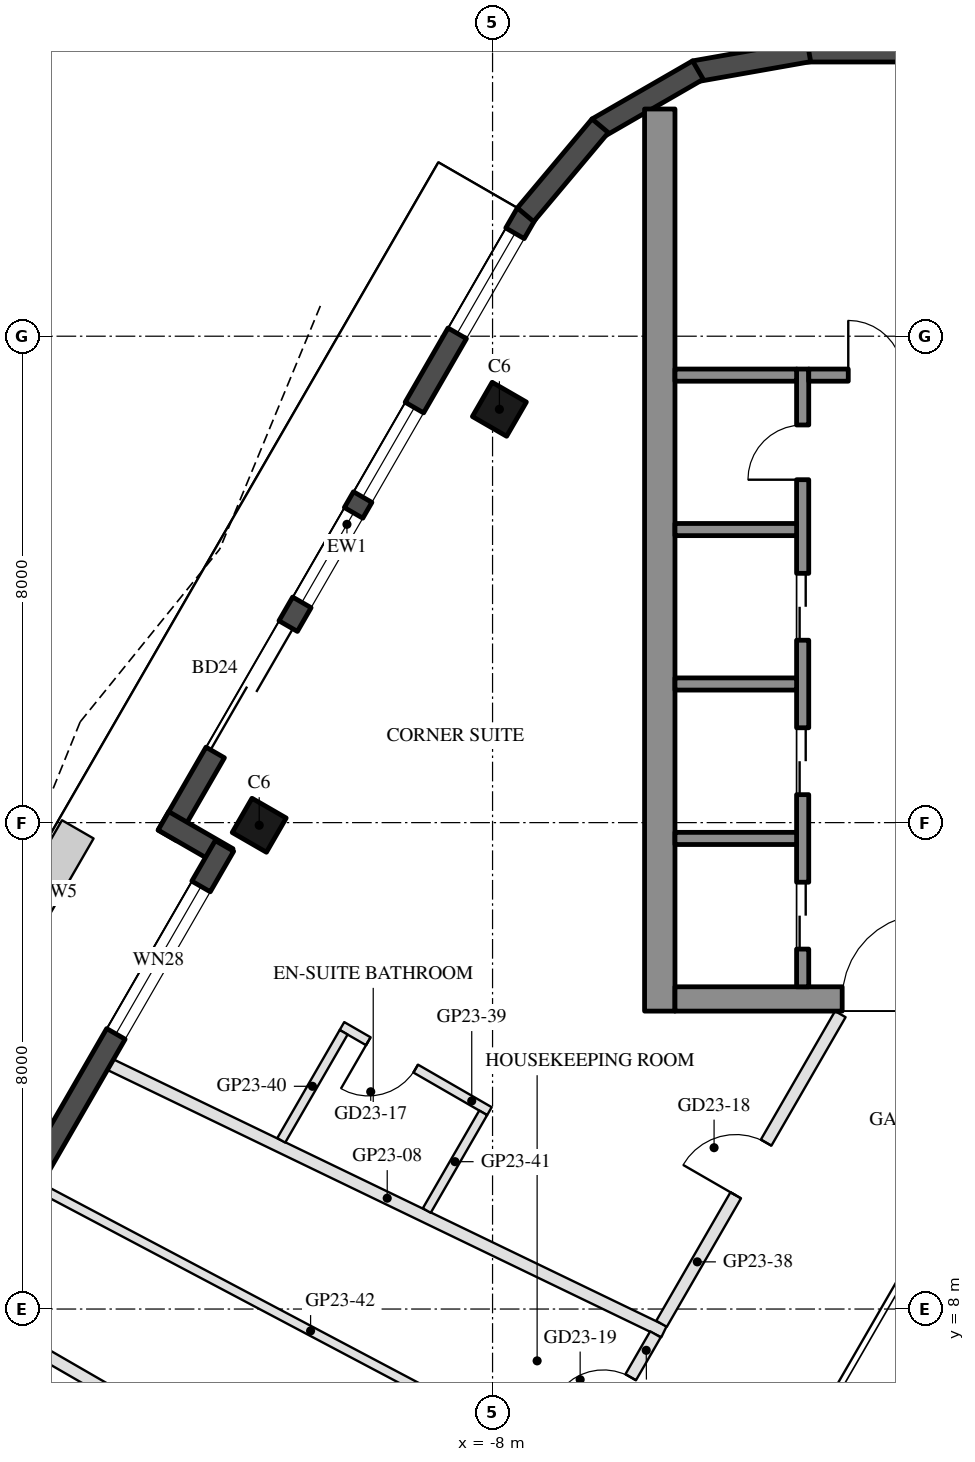
"""IFC4 building model, lengths in metres.
Left out: names, types, materials, properties, quantities, classifications, styles, units other than length and angle.
Written with IfcOpenShell. Run it as: python <this file> out.ifc"""

import sys

from ifc_helpers import new_model, si_unit, direction, frame, frame_2d, origin, origin_2d, place, context, subcontext, project, spatial, rectangle, hollow_rectangle, extrude, boolean, halfspace, element, fill, save


model = new_model("IFC4")
c1 = context("Model", 3, precision=1e-05, world=origin(), true_north=direction((0.0, 1.0)))
c2 = subcontext(c1, "Body", "Model", "MODEL_VIEW")
j1 = project(units=[si_unit("LENGTHUNIT", "METRE"), si_unit("PLANEANGLEUNIT", "RADIAN")], contexts=[c1])
p1 = place(None, origin())
s1 = spatial("IfcSite", under=j1, at=p1, CompositionType="ELEMENT")
p2 = place(p1, origin())
s2 = spatial("IfcBuilding", under=s1, at=p2, CompositionType="ELEMENT")
p3 = place(p2, frame((0.0, 0.0, 250.4)))
s3 = spatial("IfcBuildingStorey", under=s2, at=p3, CompositionType="ELEMENT", Elevation=250.4)
p4 = place(p3, frame((-7.888, 22.798, 0.0), z_axis=(0.0, 0.0, 1.0), x_axis=(0.5, 0.866025403784, 0.0)))
e1 = element("IfcColumn", 1, at=p4, inside=s3, PredefinedType="COLUMN", context=c2, shape_type="SweptSolid", body=[
    boolean("DIFFERENCE", extrude(hollow_rectangle(XDim=0.65, YDim=0.65, WallThickness=0.03, at=origin_2d()), origin(), (0.0, 0.0, 1.0), 3.7), halfspace(frame((0.0, 0.0, 3.653), z_axis=(0.0, 0.0, 1.0), x_axis=(1.0, 0.0, 0.0)), False)),
])
p5 = place(p3, frame((-11.838, 15.957, 0.0), z_axis=(0.0, 0.0, 1.0), x_axis=(0.5, 0.866025403784, 0.0)))
e2 = element("IfcColumn", 2, at=p5, inside=s3, PredefinedType="COLUMN", context=c2, shape_type="SweptSolid", body=[
    boolean("DIFFERENCE", extrude(hollow_rectangle(XDim=0.65, YDim=0.65, WallThickness=0.03, at=origin_2d()), origin(), (0.0, 0.0, 1.0), 3.7), halfspace(frame((0.0, 0.0, 3.66), z_axis=(0.0, 0.0, 1.0), x_axis=(1.0, 0.0, 0.0)), False)),
])
p6 = place(p3, frame((-7.441, 26.022, 0.0), z_axis=(0.0, 0.0, 1.0), x_axis=(-0.499992533062, -0.86602971478, 0.0)))
e3 = element("IfcWall", 3, at=p6, inside=s3, PredefinedType="SOLIDWALL", context=c2, shape_type="SweptSolid", body=[
    extrude(rectangle(XDim=11.816, YDim=0.35, at=frame_2d((5.908, 0.0))), origin(), (0.0, 0.0, 1.0), 3.55),
])
p7 = place(p6, frame((0.381, 0.0, 0.3)))
e4 = element("IfcOpeningElement", 4, at=p7, cuts=e3, PredefinedType="OPENING", context=c2, shape_type="SweptSolid", body=[
    extrude(rectangle(XDim=1.9, YDim=2.65, at=frame_2d((0.95, 1.325))), frame((0.0, 0.185, 0.0), z_axis=(0.0, -1.0, 0.0), x_axis=(1.0, 0.0, 0.0)), (0.0, 0.0, 1.0), 0.37),
])
p8 = place(p6, frame((7.841, 0.0, 0.0)))
e5 = element("IfcOpeningElement", 5, at=p8, cuts=e3, PredefinedType="OPENING", context=c2, shape_type="SweptSolid", body=[
    extrude(rectangle(XDim=2.4, YDim=2.4, at=frame_2d((1.2, 1.2))), frame((0.0, 0.185, 0.0), z_axis=(0.0, -1.0, 0.0), x_axis=(1.0, 0.0, 0.0)), (0.0, 0.0, 1.0), 0.37),
])
p9 = place(p6, frame((3.69, 0.0, 0.3)))
e6 = element("IfcOpeningElement", 6, at=p9, cuts=e3, PredefinedType="OPENING", context=c2, shape_type="SweptSolid", body=[
    extrude(rectangle(XDim=1.7, YDim=2.65, at=frame_2d((0.85, 1.325))), frame((0.0, 0.185, 0.0), z_axis=(0.0, -1.0, 0.0), x_axis=(1.0, 0.0, 0.0)), (0.0, 0.0, 1.0), 0.37),
])
p10 = place(p6, frame((5.69, 0.0, 0.3)))
e7 = element("IfcOpeningElement", 7, at=p10, cuts=e3, PredefinedType="OPENING", context=c2, shape_type="SweptSolid", body=[
    extrude(rectangle(XDim=1.7, YDim=2.65, at=frame_2d((0.85, 1.325))), frame((0.0, 0.185, 0.0), z_axis=(0.0, -1.0, 0.0), x_axis=(1.0, 0.0, 0.0)), (0.0, 0.0, 1.0), 0.37),
])
p11 = place(p3, frame((-13.413, 16.029, 0.0), z_axis=(0.0, 0.0, 1.0), x_axis=(0.866005645448, -0.500034220881, 0.0)))
e8 = element("IfcWall", 8, at=p11, inside=s3, PredefinedType="SOLIDWALL", context=c2, shape_type="SweptSolid", body=[
    extrude(rectangle(XDim=1.22, YDim=0.35, at=frame_2d((0.61, 0.0))), origin(), (0.0, 0.0, 1.0), 3.55),
])
p12 = place(p3, frame((-12.409, 15.617, 0.0), z_axis=(0.0, 0.0, 1.0), x_axis=(-0.500003597184, -0.866023326939, 0.0)))
e9 = element("IfcWall", 9, at=p12, inside=s3, PredefinedType="SOLIDWALL", context=c2, shape_type="SweptSolid", body=[
    extrude(rectangle(XDim=6.74, YDim=0.35, at=frame_2d((3.37, 0.0))), origin(), (0.0, 0.0, 1.0), 3.55),
])
p13 = place(p12, frame((0.77, 0.0, 0.3)))
e10 = element("IfcOpeningElement", 10, at=p13, cuts=e9, PredefinedType="OPENING", context=c2, shape_type="SweptSolid", body=[
    extrude(rectangle(XDim=2.8, YDim=2.65, at=frame_2d((1.4, 1.325))), frame((0.0, 0.185, 0.0), z_axis=(0.0, -1.0, 0.0), x_axis=(1.0, 0.0, 0.0)), (0.0, 0.0, 1.0), 0.37),
])
p14 = place(p3, frame((2.829, 28.685, 0.0), z_axis=(0.0, 0.0, 1.0), x_axis=(-1.0, 0.0, 0.0)))
e11 = element("IfcWall", 11, at=p14, inside=s3, PredefinedType="SOLIDWALL", context=c2, shape_type="SweptSolid", body=[
    extrude(rectangle(XDim=5.658, YDim=0.35, at=frame_2d((2.829, 0.0))), origin(), (0.0, 0.0, 1.0), 3.55),
])
for number, where, z_axis, x_axis in (
    (12, (-2.799, 28.688, 0.0), (0.0, 0.0, 1.0), (-0.985, -0.174, 0.0)),
    (13, (-4.623, 28.377, 0.0), (0.0, 0.0, 1.0), (-0.866, -0.5, 0.0)),
):
    element("IfcWall", number, at=place(p3, frame(where, z_axis=z_axis, x_axis=x_axis)), inside=s3, PredefinedType="SOLIDWALL", context=c2, shape_type="SweptSolid", body=[
        extrude(rectangle(XDim=1.91, YDim=0.35, at=frame_2d((0.955, 0.0))), origin(), (0.0, 0.0, 1.0), 3.55),
    ])
p15 = place(p3, frame((-6.23, 27.461, 0.0), z_axis=(0.0, 0.0, 1.0), x_axis=(-0.642808304945, -0.766027077259, 0.0)))
e14 = element("IfcWall", 14, at=p15, inside=s3, PredefinedType="SOLIDWALL", context=c2, shape_type="SweptSolid", body=[
    extrude(rectangle(XDim=1.91, YDim=0.35, at=frame_2d((0.955, 0.0))), origin(), (0.0, 0.0, 1.0), 3.55),
])
p16 = place(p3, frame((-5.25, 12.9, 0.0), z_axis=(0.0, 0.0, 1.0), x_axis=(0.0, 1.0, 0.0)))
e15 = element("IfcWall", 15, at=p16, inside=s3, PredefinedType="SHEAR", context=c2, shape_type="SweptSolid", body=[
    extrude(rectangle(XDim=14.837, YDim=0.5, at=frame_2d((7.418, 0.0))), origin(), (0.0, 0.0, 1.0), 3.5),
])
p17 = place(p3, frame((5.0, 13.1, 0.0), z_axis=(0.0, 0.0, 1.0), x_axis=(-1.0, 0.0, 0.0)))
e16 = element("IfcWall", 16, at=p17, inside=s3, PredefinedType="SHEAR", context=c2, shape_type="SweptSolid", body=[
    extrude(rectangle(XDim=10.0, YDim=0.4, at=frame_2d((5.0, 0.0))), origin(), (0.0, 0.0, 1.0), 3.5),
])
p18 = place(p17, frame((3.55, 0.0, 0.0)))
e17 = element("IfcOpeningElement", 17, at=p18, cuts=e16, PredefinedType="OPENING", context=c2, shape_type="SweptSolid", body=[
    extrude(rectangle(XDim=1.1, YDim=2.1, at=frame_2d((0.55, 1.05))), frame((0.0, 0.21, 0.0), z_axis=(0.0, -1.0, 0.0), x_axis=(1.0, 0.0, 0.0)), (0.0, 0.0, 1.0), 0.42),
])
p19 = place(p17, frame((5.85, 0.0, 0.0)))
e18 = element("IfcOpeningElement", 18, at=p19, cuts=e16, PredefinedType="OPENING", context=c2, shape_type="SweptSolid", body=[
    extrude(rectangle(XDim=1.4, YDim=2.1, at=frame_2d((0.7, 1.05))), frame((0.0, 0.21, 0.0), z_axis=(0.0, -1.0, 0.0), x_axis=(1.0, 0.0, 0.0)), (0.0, 0.0, 1.0), 0.42),
])
p20 = place(p3, frame((-2.9, 13.3, 0.0), z_axis=(0.0, 0.0, 1.0), x_axis=(0.0, 1.0, 0.0)))
e19 = element("IfcWall", 19, at=p20, inside=s3, PredefinedType="SHEAR", context=c2, shape_type="SweptSolid", body=[
    extrude(rectangle(XDim=10.16, YDim=0.2, at=frame_2d((5.08, 0.0))), origin(), (0.0, 0.0, 1.0), 3.5),
])
p21 = place(p20, frame((0.62, 0.0, 0.0)))
e20 = element("IfcOpeningElement", 20, at=p21, cuts=e19, PredefinedType="OPENING", context=c2, shape_type="SweptSolid", body=[
    extrude(rectangle(XDim=1.1, YDim=2.1, at=frame_2d((0.55, 1.05))), frame((0.0, 0.11, 0.0), z_axis=(0.0, -1.0, 0.0), x_axis=(1.0, 0.0, 0.0)), (0.0, 0.0, 1.0), 0.22),
])
p22 = place(p20, frame((3.16, 0.0, 0.0)))
e21 = element("IfcOpeningElement", 21, at=p22, cuts=e19, PredefinedType="OPENING", context=c2, shape_type="SweptSolid", body=[
    extrude(rectangle(XDim=1.1, YDim=2.1, at=frame_2d((0.55, 1.05))), frame((0.0, 0.11, 0.0), z_axis=(0.0, -1.0, 0.0), x_axis=(1.0, 0.0, 0.0)), (0.0, 0.0, 1.0), 0.22),
])
p23 = place(p20, frame((5.7, 0.0, 0.0)))
e22 = element("IfcOpeningElement", 22, at=p23, cuts=e19, PredefinedType="OPENING", context=c2, shape_type="SweptSolid", body=[
    extrude(rectangle(XDim=1.1, YDim=2.1, at=frame_2d((0.55, 1.05))), frame((0.0, 0.11, 0.0), z_axis=(0.0, -1.0, 0.0), x_axis=(1.0, 0.0, 0.0)), (0.0, 0.0, 1.0), 0.22),
])
p24 = place(p20, frame((8.34, 0.0, 0.0)))
e23 = element("IfcOpeningElement", 23, at=p24, cuts=e19, PredefinedType="OPENING", context=c2, shape_type="SweptSolid", body=[
    extrude(rectangle(XDim=0.9, YDim=2.1, at=frame_2d((0.45, 1.05))), frame((0.0, 0.11, 0.0), z_axis=(0.0, -1.0, 0.0), x_axis=(1.0, 0.0, 0.0)), (0.0, 0.0, 1.0), 0.22),
])
p25 = place(p3, frame((-0.4, 23.36, 0.0), z_axis=(0.0, 0.0, 1.0), x_axis=(-1.0, 0.0, 0.0)))
e24 = element("IfcWall", 24, at=p25, inside=s3, PredefinedType="SHEAR", context=c2, shape_type="SweptSolid", body=[
    extrude(rectangle(XDim=2.4, YDim=0.2, at=frame_2d((1.2, 0.0))), origin(), (0.0, 0.0, 1.0), 3.5),
])
p26 = place(p25, frame((0.85, 0.0, 0.0)))
e25 = element("IfcOpeningElement", 25, at=p26, cuts=e24, PredefinedType="OPENING", context=c2, shape_type="SweptSolid", body=[
    extrude(rectangle(XDim=0.9, YDim=2.1, at=frame_2d((0.45, 1.05))), frame((0.0, 0.11, 0.0), z_axis=(0.0, -1.0, 0.0), x_axis=(1.0, 0.0, 0.0)), (0.0, 0.0, 1.0), 0.22),
])
for number, where, z_axis, x_axis in (
    (26, (-3.0, 15.74, 0.0), (0.0, 0.0, 1.0), (-1.0, 0.0, 0.0)),
    (27, (-3.0, 18.28, 0.0), (0.0, 0.0, 1.0), (-1.0, 0.0, 0.0)),
    (28, (-3.0, 20.82, 0.0), (0.0, 0.0, 1.0), (-1.0, 0.0, 0.0)),
    (29, (-3.0, 23.36, 0.0), (0.0, 0.0, 1.0), (-1.0, 0.0, 0.0)),
):
    element("IfcWall", number, at=place(p3, frame(where, z_axis=z_axis, x_axis=x_axis)), inside=s3, PredefinedType="SHEAR", context=c2, shape_type="SweptSolid", body=[
        extrude(rectangle(XDim=2.0, YDim=0.2, at=frame_2d((1.0, 0.0))), origin(), (0.0, 0.0, 1.0), 3.5),
    ])
p27 = place(p3, frame((-14.284, 12.019, 0.0), z_axis=(0.0, 0.0, 1.0), x_axis=(0.90065661155, -0.434531550144, 0.0)))
e30 = element("IfcWall", 30, at=p27, inside=s3, PredefinedType="PARTITIONING", context=c2, shape_type="SweptSolid", body=[
    extrude(rectangle(XDim=10.108, YDim=0.2, at=frame_2d((5.054, 0.0))), origin(), (0.0, 0.0, 1.0), 2.95),
])
p28 = place(p3, frame((-17.397, 8.427, 0.0), z_axis=(0.0, 0.0, 1.0), x_axis=(0.866027479907, -0.499996404033, 0.0)))
e31 = element("IfcWall", 31, at=p28, inside=s3, PredefinedType="PARTITIONING", context=c2, shape_type="SweptSolid", body=[
    extrude(rectangle(XDim=10.98, YDim=0.2, at=frame_2d((5.49, 0.0))), origin(), (0.0, 0.0, 1.0), 3.1),
])
p29 = place(p3, frame((-5.221, 7.757, 0.0), z_axis=(0.0, 0.0, 1.0), x_axis=(0.49998360248, 0.86603487069, 0.0)))
e32 = element("IfcWall", 32, at=p29, inside=s3, PredefinedType="PARTITIONING", context=c2, shape_type="SweptSolid", body=[
    extrude(rectangle(XDim=5.881, YDim=0.2, at=frame_2d((2.94, 0.0))), origin(), (0.0, 0.0, 1.0), 2.95),
])
p30 = place(p29, frame((2.44, 0.0, 0.0)))
e33 = element("IfcOpeningElement", 33, at=p30, cuts=e32, PredefinedType="OPENING", context=c2, shape_type="SweptSolid", body=[
    extrude(rectangle(XDim=1.0, YDim=2.1, at=frame_2d((0.5, 1.05))), frame((0.0, 0.11, 0.0), z_axis=(0.0, -1.0, 0.0), x_axis=(1.0, 0.0, 0.0)), (0.0, 0.0, 1.0), 0.22),
])
p31 = place(p3, frame((-8.052, 11.254, 0.0), z_axis=(0.0, 0.0, 1.0), x_axis=(-0.865996816683, 0.500049511043, 0.0)))
e34 = element("IfcWall", 34, at=p31, inside=s3, PredefinedType="PARTITIONING", context=c2, shape_type="SweptSolid", body=[
    extrude(rectangle(XDim=2.8, YDim=0.15, at=frame_2d((1.4, 0.0))), origin(), (0.0, 0.0, 1.0), 3.55),
])
p32 = place(p31, frame((1.4, 0.0, 0.0)))
e35 = element("IfcOpeningElement", 35, at=p32, cuts=e34, PredefinedType="OPENING", context=c2, shape_type="SweptSolid", body=[
    extrude(rectangle(XDim=0.9, YDim=2.1, at=frame_2d((0.45, 1.05))), frame((0.0, 0.085, 0.0), z_axis=(0.0, -1.0, 0.0), x_axis=(1.0, 0.0, 0.0)), (0.0, 0.0, 1.0), 0.17),
])
p33 = place(p3, frame((-10.449, 12.552, 0.0), z_axis=(0.0, 0.0, 1.0), x_axis=(-0.500041704412, -0.866001324392, 0.0)))
e36 = element("IfcWall", 36, at=p33, inside=s3, PredefinedType="PARTITIONING", context=c2, shape_type="SweptSolid", body=[
    extrude(rectangle(XDim=2.052, YDim=0.15, at=frame_2d((1.026, 0.0))), origin(), (0.0, 0.0, 1.0), 2.95),
])
p34 = place(p3, frame((-8.154, 11.227, 0.0), z_axis=(0.0, 0.0, 1.0), x_axis=(-0.500086883948, -0.865975235502, 0.0)))
e37 = element("IfcWall", 37, at=p34, inside=s3, PredefinedType="PARTITIONING", context=c2, shape_type="SweptSolid", body=[
    extrude(rectangle(XDim=1.856, YDim=0.15, at=frame_2d((0.928, 0.0))), origin(), (0.0, 0.0, 1.0), 2.95),
])
p35 = place(p3, frame((-15.451, 9.998, 0.0), z_axis=(0.0, 0.0, 1.0), x_axis=(0.883969770247, -0.467544057058, 0.0)))
e38 = element("IfcWall", 38, at=p35, inside=s3, PredefinedType="PARTITIONING", context=c2, shape_type="SweptSolid", body=[
    extrude(rectangle(XDim=10.087, YDim=0.15, at=frame_2d((5.043, 0.0))), origin(), (0.0, 0.0, 1.0), 3.1),
])
p36 = place(p3, frame((-6.585, 5.394, 0.0), z_axis=(0.0, 0.0, 1.0), x_axis=(0.499981564561, 0.866036047228, 0.0)))
e39 = element("IfcWall", 39, at=p36, inside=s3, PredefinedType="PARTITIONING", context=c2, shape_type="SweptSolid", body=[
    extrude(rectangle(XDim=2.528, YDim=0.2, at=frame_2d((1.264, 0.0))), origin(), (0.0, 0.0, 1.0), 2.95),
])
p37 = place(p36, frame((0.814, 0.0, 0.0)))
e40 = element("IfcOpeningElement", 40, at=p37, cuts=e39, PredefinedType="OPENING", context=c2, shape_type="SweptSolid", body=[
    extrude(rectangle(XDim=0.9, YDim=2.1, at=frame_2d((0.45, 1.05))), frame((0.0, 0.11, 0.0), z_axis=(0.0, -1.0, 0.0), x_axis=(1.0, 0.0, 0.0)), (0.0, 0.0, 1.0), 0.22),
])
p38 = place(p7, origin())
e41 = element("IfcWindow", 41, at=p38, inside=s3, PartitioningType="SINGLE_PANEL", PredefinedType="WINDOW", context=c2, shape_type="SweptSolid", body=[
    extrude(rectangle(XDim=1.9, YDim=2.65, at=frame_2d((0.95, 1.325))), frame((0.0, 0.03, 0.0), z_axis=(0.0, -1.0, 0.0), x_axis=(1.0, 0.0, 0.0)), (0.0, 0.0, 1.0), 0.06),
])
fill(e4, e41)
p39 = place(p8, frame((2.4, 0.0, 0.0), z_axis=(0.0, 0.0, 1.0), x_axis=(-1.0, 0.0, 0.0)))
e42 = element("IfcDoor", 42, at=p39, inside=s3, OperationType="SLIDING_TO_LEFT", PredefinedType="DOOR", context=c2, shape_type="SweptSolid", body=[
    extrude(rectangle(XDim=2.4, YDim=2.4, at=frame_2d((1.2, 1.2))), frame((0.0, 0.025, 0.0), z_axis=(0.0, -1.0, 0.0), x_axis=(1.0, 0.0, 0.0)), (0.0, 0.0, 1.0), 0.05),
])
fill(e5, e42)
p40 = place(p9, origin())
e43 = element("IfcWindow", 43, at=p40, inside=s3, PartitioningType="SINGLE_PANEL", PredefinedType="WINDOW", context=c2, shape_type="SweptSolid", body=[
    extrude(rectangle(XDim=1.7, YDim=2.65, at=frame_2d((0.85, 1.325))), frame((0.0, 0.03, 0.0), z_axis=(0.0, -1.0, 0.0), x_axis=(1.0, 0.0, 0.0)), (0.0, 0.0, 1.0), 0.06),
])
fill(e6, e43)
p41 = place(p10, origin())
e44 = element("IfcWindow", 44, at=p41, inside=s3, PartitioningType="SINGLE_PANEL", PredefinedType="WINDOW", context=c2, shape_type="SweptSolid", body=[
    extrude(rectangle(XDim=1.7, YDim=2.65, at=frame_2d((0.85, 1.325))), frame((0.0, 0.03, 0.0), z_axis=(0.0, -1.0, 0.0), x_axis=(1.0, 0.0, 0.0)), (0.0, 0.0, 1.0), 0.06),
])
fill(e7, e44)
p42 = place(p13, origin())
e45 = element("IfcWindow", 45, at=p42, inside=s3, PartitioningType="SINGLE_PANEL", PredefinedType="WINDOW", context=c2, shape_type="SweptSolid", body=[
    extrude(rectangle(XDim=2.8, YDim=2.65, at=frame_2d((1.4, 1.325))), frame((0.0, 0.03, 0.0), z_axis=(0.0, -1.0, 0.0), x_axis=(1.0, 0.0, 0.0)), (0.0, 0.0, 1.0), 0.06),
])
fill(e10, e45)
p43 = place(p21, origin())
e46 = element("IfcDoor", 46, at=p43, inside=s3, OperationType="DOUBLE_DOOR_SLIDING", PredefinedType="DOOR", context=c2, shape_type="SweptSolid", body=[
    extrude(rectangle(XDim=1.1, YDim=2.1, at=frame_2d((0.55, 1.05))), frame((0.0, 0.025, 0.0), z_axis=(0.0, -1.0, 0.0), x_axis=(1.0, 0.0, 0.0)), (0.0, 0.0, 1.0), 0.05),
])
fill(e20, e46)
p44 = place(p22, origin())
e47 = element("IfcDoor", 47, at=p44, inside=s3, OperationType="DOUBLE_DOOR_SLIDING", PredefinedType="DOOR", context=c2, shape_type="SweptSolid", body=[
    extrude(rectangle(XDim=1.1, YDim=2.1, at=frame_2d((0.55, 1.05))), frame((0.0, 0.025, 0.0), z_axis=(0.0, -1.0, 0.0), x_axis=(1.0, 0.0, 0.0)), (0.0, 0.0, 1.0), 0.05),
])
fill(e21, e47)
p45 = place(p23, origin())
e48 = element("IfcDoor", 48, at=p45, inside=s3, OperationType="DOUBLE_DOOR_SLIDING", PredefinedType="DOOR", context=c2, shape_type="SweptSolid", body=[
    extrude(rectangle(XDim=1.1, YDim=2.1, at=frame_2d((0.55, 1.05))), frame((0.0, 0.025, 0.0), z_axis=(0.0, -1.0, 0.0), x_axis=(1.0, 0.0, 0.0)), (0.0, 0.0, 1.0), 0.05),
])
fill(e22, e48)
p46 = place(p24, origin())
e49 = element("IfcDoor", 49, at=p46, inside=s3, OperationType="SINGLE_SWING_LEFT", PredefinedType="DOOR", context=c2, shape_type="SweptSolid", body=[
    extrude(rectangle(XDim=0.9, YDim=2.1, at=frame_2d((0.45, 1.05))), frame((0.0, 0.025, 0.0), z_axis=(0.0, -1.0, 0.0), x_axis=(1.0, 0.0, 0.0)), (0.0, 0.0, 1.0), 0.05),
])
fill(e23, e49)
p47 = place(p26, frame((0.9, 0.0, 0.0), z_axis=(0.0, 0.0, 1.0), x_axis=(-1.0, 0.0, 0.0)))
e50 = element("IfcDoor", 50, at=p47, inside=s3, OperationType="SINGLE_SWING_LEFT", PredefinedType="DOOR", context=c2, shape_type="SweptSolid", body=[
    extrude(rectangle(XDim=0.9, YDim=2.1, at=frame_2d((0.45, 1.05))), frame((0.0, 0.025, 0.0), z_axis=(0.0, -1.0, 0.0), x_axis=(1.0, 0.0, 0.0)), (0.0, 0.0, 1.0), 0.05),
])
fill(e25, e50)
p48 = place(p19, frame((1.4, 0.0, 0.0), z_axis=(0.0, 0.0, 1.0), x_axis=(-1.0, 0.0, 0.0)))
e51 = element("IfcDoor", 51, at=p48, inside=s3, OperationType="DOUBLE_DOOR_SINGLE_SWING", PredefinedType="DOOR", context=c2, shape_type="SweptSolid", body=[
    extrude(rectangle(XDim=1.4, YDim=2.1, at=frame_2d((0.7, 1.05))), frame((0.0, 0.025, 0.0), z_axis=(0.0, -1.0, 0.0), x_axis=(1.0, 0.0, 0.0)), (0.0, 0.0, 1.0), 0.05),
])
fill(e18, e51)
p49 = place(p32, origin())
e52 = element("IfcDoor", 52, at=p49, inside=s3, OperationType="SINGLE_SWING_RIGHT", PredefinedType="DOOR", context=c2, shape_type="SweptSolid", body=[
    extrude(rectangle(XDim=0.9, YDim=2.1, at=frame_2d((0.45, 1.05))), frame((0.0, 0.025, 0.0), z_axis=(0.0, -1.0, 0.0), x_axis=(1.0, 0.0, 0.0)), (0.0, 0.0, 1.0), 0.05),
])
fill(e35, e52)
p50 = place(p30, origin())
e53 = element("IfcDoor", 53, at=p50, inside=s3, OperationType="SINGLE_SWING_LEFT", PredefinedType="DOOR", context=c2, shape_type="SweptSolid", body=[
    extrude(rectangle(XDim=1.0, YDim=2.1, at=frame_2d((0.5, 1.05))), frame((0.0, 0.025, 0.0), z_axis=(0.0, -1.0, 0.0), x_axis=(1.0, 0.0, 0.0)), (0.0, 0.0, 1.0), 0.05),
])
fill(e33, e53)
p51 = place(p37, origin())
e54 = element("IfcDoor", 54, at=p51, inside=s3, OperationType="SINGLE_SWING_LEFT", PredefinedType="DOOR", context=c2, shape_type="SweptSolid", body=[
    extrude(rectangle(XDim=0.9, YDim=2.1, at=frame_2d((0.45, 1.05))), frame((0.0, 0.025, 0.0), z_axis=(0.0, -1.0, 0.0), x_axis=(1.0, 0.0, 0.0)), (0.0, 0.0, 1.0), 0.05),
])
fill(e40, e54)
save(model, sys.argv[1])
